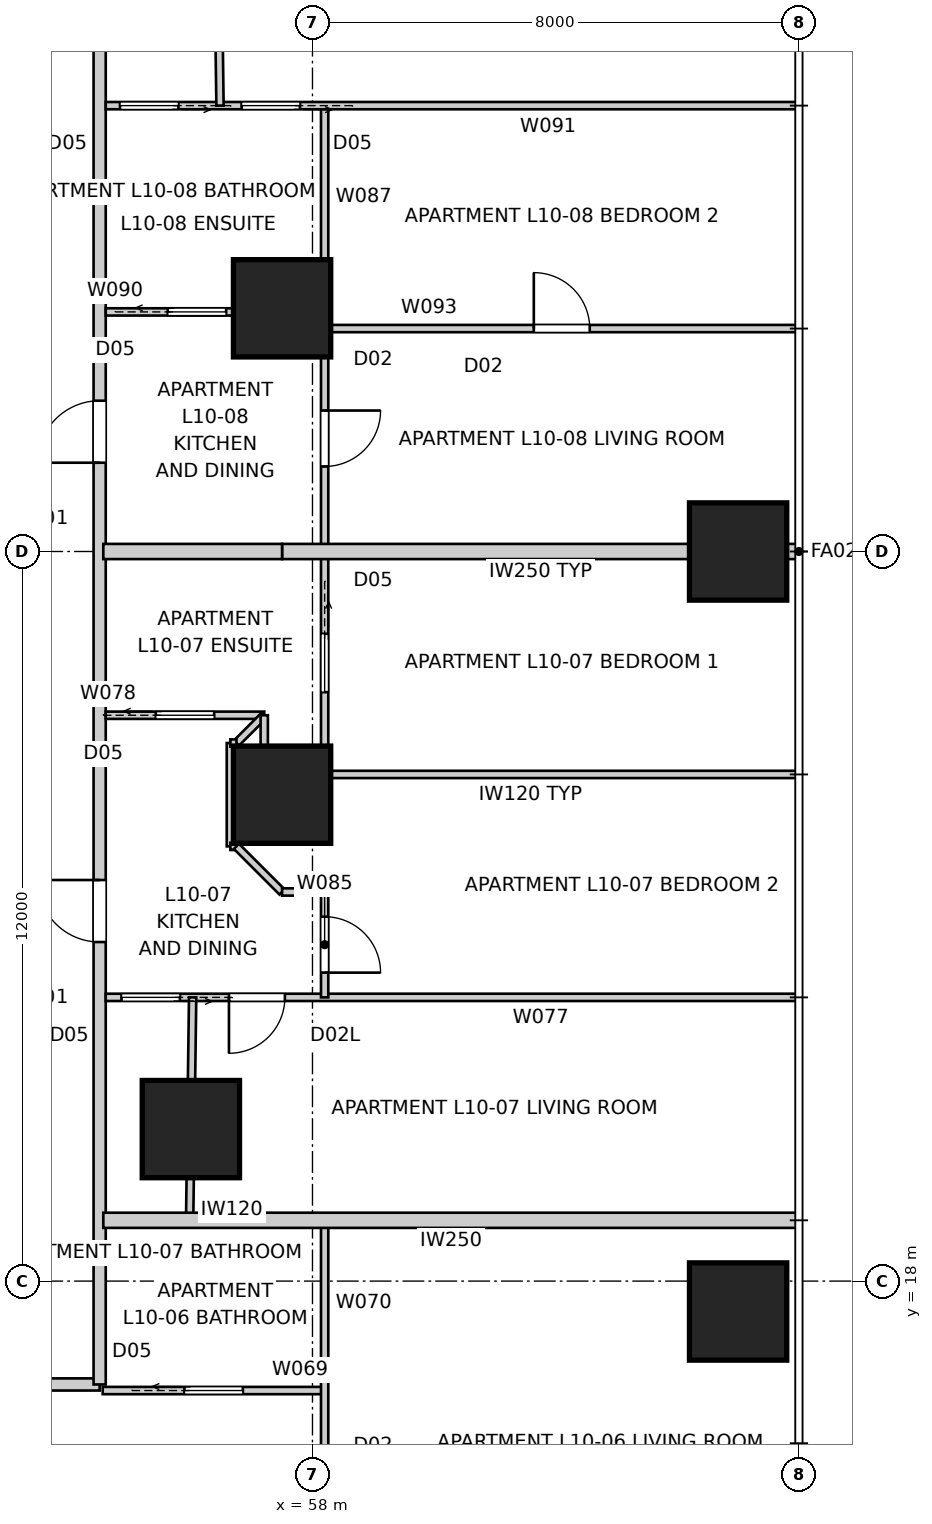
"""IFC4 building model, lengths in metres.
Left out: names, types, materials, properties, quantities, classifications, styles, units other than length and angle.
Written with IfcOpenShell. Run it as: python <this file> out.ifc"""

import sys

from ifc_helpers import new_model, si_unit, direction, frame, frame_2d, origin, origin_2d, place, context, subcontext, project, spatial, rectangle, extrude, element, fill, save


model = new_model("IFC4")
c1 = context("Model", 3, precision=1e-05, world=origin(), true_north=direction((0.0, 1.0)))
c2 = subcontext(c1, "Body", "Model", "MODEL_VIEW")
j1 = project(units=[si_unit("LENGTHUNIT", "METRE"), si_unit("PLANEANGLEUNIT", "RADIAN")], contexts=[c1])
p1 = place(None, origin())
s1 = spatial("IfcSite", under=j1, at=p1, CompositionType="ELEMENT")
p2 = place(p1, origin())
s2 = spatial("IfcBuilding", under=s1, at=p2, CompositionType="ELEMENT")
p3 = place(p2, frame((0.0, 0.0, 38.8)))
s3 = spatial("IfcBuildingStorey", under=s2, at=p3, CompositionType="ELEMENT", Elevation=38.8)
for number, where, z_axis, x_axis in (
    (1, (65.0, 17.5, 0.0), (0.0, 0.0, 1.0), (1.0, 0.0, 0.0)),
    (2, (65.0, 30.0, 0.0), (0.0, 0.0, 1.0), (1.0, 0.0, 0.0)),
):
    element("IfcColumn", number, at=place(p3, frame(where, z_axis=z_axis, x_axis=x_axis)), inside=s3, PredefinedType="COLUMN", context=c2, shape_type="SweptSolid", body=[
        extrude(rectangle(XDim=1.6, YDim=1.6, at=origin_2d()), origin(), (0.0, 0.0, 1.0), 3.2),
    ])
for number, where, z_axis, x_axis in (
    (3, (57.5, 26.0, 0.0), (0.0, 0.0, 1.0), (1.0, 0.0, 0.0)),
    (4, (57.5, 34.0, 0.0), (0.0, 0.0, 1.0), (1.0, 0.0, 0.0)),
    (5, (56.0, 20.5, 0.0), (0.0, 0.0, 1.0), (1.0, 0.0, 0.0)),
):
    element("IfcColumn", number, at=place(p3, frame(where, z_axis=z_axis, x_axis=x_axis)), inside=s3, PredefinedType="COLUMN", context=c2, shape_type="SweptSolid", body=[
        extrude(rectangle(XDim=1.6, YDim=1.6, at=origin_2d()), origin(), (0.0, 0.0, 1.0), 3.4),
    ])
p4 = place(p3, frame((26.3, 16.3, 0.0), z_axis=(0.0, 0.0, 1.0), x_axis=(1.0, 0.0, 0.0)))
e6 = element("IfcWall", 6, at=p4, inside=s3, PredefinedType="PARTITIONING", context=c2, shape_type="SweptSolid", body=[
    extrude(rectangle(XDim=28.2, YDim=0.2, at=frame_2d((14.1, 0.0))), origin(), (0.0, 0.0, 1.0), 3.2),
])
p5 = place(p4, frame((4.738, 0.0, 0.0)))
e7 = element("IfcOpeningElement", 7, at=p5, cuts=e6, PredefinedType="OPENING", context=c2, shape_type="SweptSolid", body=[
    extrude(rectangle(XDim=1.02, YDim=2.34, at=frame_2d((0.51, 1.17))), frame((0.0, 0.11, 0.0), z_axis=(0.0, -1.0, 0.0), x_axis=(1.0, 0.0, 0.0)), (0.0, 0.0, 1.0), 0.22),
])
p6 = place(p4, frame((14.525, 0.0, 0.0)))
e8 = element("IfcOpeningElement", 8, at=p6, cuts=e6, PredefinedType="OPENING", context=c2, shape_type="SweptSolid", body=[
    extrude(rectangle(XDim=1.02, YDim=2.34, at=frame_2d((0.51, 1.17))), frame((0.0, 0.11, 0.0), z_axis=(0.0, -1.0, 0.0), x_axis=(1.0, 0.0, 0.0)), (0.0, 0.0, 1.0), 0.22),
])
p7 = place(p4, frame((22.333, 0.0, 0.0)))
e9 = element("IfcOpeningElement", 9, at=p7, cuts=e6, PredefinedType="OPENING", context=c2, shape_type="SweptSolid", body=[
    extrude(rectangle(XDim=1.02, YDim=2.34, at=frame_2d((0.51, 1.17))), frame((0.0, 0.11, 0.0), z_axis=(0.0, -1.0, 0.0), x_axis=(1.0, 0.0, 0.0)), (0.0, 0.0, 1.0), 0.22),
])
p8 = place(p4, frame((25.765, 0.0, 0.0)))
e10 = element("IfcOpeningElement", 10, at=p8, cuts=e6, PredefinedType="OPENING", context=c2, shape_type="SweptSolid", body=[
    extrude(rectangle(XDim=1.02, YDim=2.0, at=frame_2d((0.51, 1.0))), frame((0.0, 0.11, 0.0), z_axis=(0.0, -1.0, 0.0), x_axis=(1.0, 0.0, 0.0)), (0.0, 0.0, 1.0), 0.22),
])
p9 = place(p4, frame((1.015, 0.0, 0.0)))
e11 = element("IfcOpeningElement", 11, at=p9, cuts=e6, PredefinedType="OPENING", context=c2, shape_type="SweptSolid", body=[
    extrude(rectangle(XDim=1.02, YDim=2.0, at=frame_2d((0.51, 1.0))), frame((0.0, 0.11, 0.0), z_axis=(0.0, -1.0, 0.0), x_axis=(1.0, 0.0, 0.0)), (0.0, 0.0, 1.0), 0.22),
])
p10 = place(p3, frame((54.5, 16.3, 0.0), z_axis=(0.0, 0.0, 1.0), x_axis=(0.0, 1.0, 0.0)))
e12 = element("IfcWall", 12, at=p10, inside=s3, PredefinedType="PARTITIONING", context=c2, shape_type="SweptSolid", body=[
    extrude(rectangle(XDim=28.2, YDim=0.2, at=frame_2d((14.1, 0.0))), origin(), (0.0, 0.0, 1.0), 3.2),
])
p11 = place(p10, frame((7.277, 0.0, 0.0)))
e13 = element("IfcOpeningElement", 13, at=p11, cuts=e12, PredefinedType="OPENING", context=c2, shape_type="SweptSolid", body=[
    extrude(rectangle(XDim=1.02, YDim=2.34, at=frame_2d((0.51, 1.17))), frame((0.0, 0.11, 0.0), z_axis=(0.0, -1.0, 0.0), x_axis=(1.0, 0.0, 0.0)), (0.0, 0.0, 1.0), 0.22),
])
p12 = place(p10, frame((15.16, 0.0, 0.0)))
e14 = element("IfcOpeningElement", 14, at=p12, cuts=e12, PredefinedType="OPENING", context=c2, shape_type="SweptSolid", body=[
    extrude(rectangle(XDim=1.02, YDim=2.34, at=frame_2d((0.51, 1.17))), frame((0.0, 0.11, 0.0), z_axis=(0.0, -1.0, 0.0), x_axis=(1.0, 0.0, 0.0)), (0.0, 0.0, 1.0), 0.22),
])
p13 = place(p3, frame((66.0, 19.0, 0.0), z_axis=(0.0, 0.0, 1.0), x_axis=(-1.0, 0.0, 0.0)))
e15 = element("IfcWall", 15, at=p13, inside=s3, PredefinedType="PARTITIONING", context=c2, shape_type="SweptSolid", body=[
    extrude(rectangle(XDim=11.44, YDim=0.25, at=frame_2d((5.72, 0.0))), origin(), (0.0, 0.0, 1.0), 3.2),
])
p14 = place(p3, frame((66.0, 30.0, 0.0), z_axis=(0.0, 0.0, 1.0), x_axis=(-1.0, 0.0, 0.0)))
e16 = element("IfcWall", 16, at=p14, inside=s3, PredefinedType="PARTITIONING", context=c2, shape_type="SweptSolid", body=[
    extrude(rectangle(XDim=8.5, YDim=0.25, at=frame_2d((4.25, 0.0))), origin(), (0.0, 0.0, 1.0), 3.2),
])
p15 = place(p3, frame((57.5, 30.0, 0.0), z_axis=(0.0, 0.0, 1.0), x_axis=(-1.0, 0.0, 0.0)))
e17 = element("IfcWall", 17, at=p15, inside=s3, PredefinedType="PARTITIONING", context=c2, shape_type="SweptSolid", body=[
    extrude(rectangle(XDim=2.94, YDim=0.25, at=frame_2d((1.47, 0.0))), origin(), (0.0, 0.0, 1.0), 2.671),
])
p16 = place(p3, frame((54.55, 16.2, 0.0), z_axis=(0.0, 0.0, 1.0), x_axis=(1.0, 0.0, 0.0)))
e18 = element("IfcWall", 18, at=p16, inside=s3, PredefinedType="PARTITIONING", context=c2, shape_type="SweptSolid", body=[
    extrude(rectangle(XDim=3.65, YDim=0.12, at=frame_2d((1.825, 0.0))), origin(), (0.0, 0.0, 1.0), 3.2),
])
p17 = place(p16, frame((1.345, 0.0, 0.0)))
e19 = element("IfcOpeningElement", 19, at=p17, cuts=e18, PredefinedType="OPENING", context=c2, shape_type="SweptSolid", body=[
    extrude(rectangle(XDim=0.96, YDim=2.1, at=frame_2d((0.48, 1.05))), frame((0.0, 0.07, 0.0), z_axis=(0.0, -1.0, 0.0), x_axis=(1.0, 0.0, 0.0)), (0.0, 0.0, 1.0), 0.14),
])
p18 = place(p3, frame((58.2, 19.0, 0.0), z_axis=(0.0, 0.0, 1.0), x_axis=(0.0, -1.0, 0.0)))
e20 = element("IfcWall", 20, at=p18, inside=s3, PredefinedType="PARTITIONING", context=c2, shape_type="SweptSolid", body=[
    extrude(rectangle(XDim=7.2, YDim=0.12, at=frame_2d((3.6, 0.0))), origin(), (0.0, 0.0, 1.0), 3.2),
])
p19 = place(p18, frame((4.54, 0.0, 0.0)))
e21 = element("IfcOpeningElement", 21, at=p19, cuts=e20, PredefinedType="OPENING", context=c2, shape_type="SweptSolid", body=[
    extrude(rectangle(XDim=0.92, YDim=2.34, at=frame_2d((0.46, 1.17))), frame((0.0, 0.07, 0.0), z_axis=(0.0, -1.0, 0.0), x_axis=(1.0, 0.0, 0.0)), (0.0, 0.0, 1.0), 0.14),
])
p20 = place(p3, frame((65.96, 22.667, 0.0), z_axis=(0.0, 0.0, 1.0), x_axis=(-1.0, 0.0, 0.0)))
e22 = element("IfcWall", 22, at=p20, inside=s3, PredefinedType="PARTITIONING", context=c2, shape_type="SweptSolid", body=[
    extrude(rectangle(XDim=11.36, YDim=0.12, at=frame_2d((5.68, 0.0))), origin(), (0.0, 0.0, 1.0), 3.2),
])
p21 = place(p20, frame((8.413, 0.0, 0.0)))
e23 = element("IfcOpeningElement", 23, at=p21, cuts=e22, PredefinedType="OPENING", context=c2, shape_type="SweptSolid", body=[
    extrude(rectangle(XDim=0.92, YDim=2.1, at=frame_2d((0.46, 1.05))), frame((0.0, 0.07, 0.0), z_axis=(0.0, -1.0, 0.0), x_axis=(1.0, 0.0, 0.0)), (0.0, 0.0, 1.0), 0.14),
])
p22 = place(p20, frame((10.14, 0.0, 0.0)))
e24 = element("IfcOpeningElement", 24, at=p22, cuts=e22, PredefinedType="OPENING", context=c2, shape_type="SweptSolid", body=[
    extrude(rectangle(XDim=0.96, YDim=2.1, at=frame_2d((0.48, 1.05))), frame((0.0, 0.07, 0.0), z_axis=(0.0, -1.0, 0.0), x_axis=(1.0, 0.0, 0.0)), (0.0, 0.0, 1.0), 0.14),
])
p23 = place(p3, frame((54.6, 27.307, 0.0), z_axis=(0.0, 0.0, 1.0), x_axis=(1.0, 0.0, 0.0)))
e25 = element("IfcWall", 25, at=p23, inside=s3, PredefinedType="PARTITIONING", context=c2, shape_type="SweptSolid", body=[
    extrude(rectangle(XDim=2.607, YDim=0.12, at=frame_2d((1.303, 0.0))), origin(), (0.0, 0.0, 1.0), 3.2),
])
p24 = place(p23, frame((0.823, 0.0, 0.0)))
e26 = element("IfcOpeningElement", 26, at=p24, cuts=e25, PredefinedType="OPENING", context=c2, shape_type="SweptSolid", body=[
    extrude(rectangle(XDim=0.96, YDim=2.1, at=frame_2d((0.48, 1.05))), frame((0.0, 0.07, 0.0), z_axis=(0.0, -1.0, 0.0), x_axis=(1.0, 0.0, 0.0)), (0.0, 0.0, 1.0), 0.14),
])
p25 = place(p3, frame((57.207, 27.307, 0.0), z_axis=(0.0, 0.0, 1.0), x_axis=(-0.707295771362, -0.706917740485, 0.0)))
e27 = element("IfcWall", 27, at=p25, inside=s3, PredefinedType="PARTITIONING", context=c2, shape_type="SweptSolid", body=[
    extrude(rectangle(XDim=0.646, YDim=0.12, at=frame_2d((0.323, 0.0))), origin(), (0.0, 0.0, 1.0), 3.2),
])
p26 = place(p3, frame((56.65, 26.85, 0.0), z_axis=(0.0, 0.0, 1.0), x_axis=(0.0, -1.0, 0.0)))
e28 = element("IfcWall", 28, at=p26, inside=s3, PredefinedType="PARTITIONING", context=c2, shape_type="SweptSolid", body=[
    extrude(rectangle(XDim=1.7, YDim=0.12, at=frame_2d((0.85, 0.0))), origin(), (0.0, 0.0, 1.0), 3.2),
])
p27 = place(p3, frame((56.75, 25.15, 0.0), z_axis=(0.0, 0.0, 1.0), x_axis=(0.707106781187, -0.707106781187, 0.0)))
e29 = element("IfcWall", 29, at=p27, inside=s3, PredefinedType="PARTITIONING", context=c2, shape_type="SweptSolid", body=[
    extrude(rectangle(XDim=1.061, YDim=0.12, at=frame_2d((0.53, 0.0))), origin(), (0.0, 0.0, 1.0), 3.2),
])
p28 = place(p3, frame((57.5, 24.4, 0.0), z_axis=(0.0, 0.0, 1.0), x_axis=(1.0, 0.0, 0.0)))
e30 = element("IfcWall", 30, at=p28, inside=s3, PredefinedType="PARTITIONING", context=c2, shape_type="SweptSolid", body=[
    extrude(rectangle(XDim=0.7, YDim=0.12, at=frame_2d((0.35, 0.0))), origin(), (0.0, 0.0, 1.0), 3.2),
])
p29 = place(p3, frame((58.2, 24.4, 0.0), z_axis=(0.0, 0.0, 1.0), x_axis=(0.0, -1.0, 0.0)))
e31 = element("IfcWall", 31, at=p29, inside=s3, PredefinedType="PARTITIONING", context=c2, shape_type="SweptSolid", body=[
    extrude(rectangle(XDim=1.733, YDim=0.12, at=frame_2d((0.867, 0.0))), origin(), (0.0, 0.0, 1.0), 3.2),
])
p30 = place(p29, frame((0.407, 0.0, 0.0)))
e32 = element("IfcOpeningElement", 32, at=p30, cuts=e31, PredefinedType="OPENING", context=c2, shape_type="SweptSolid", body=[
    extrude(rectangle(XDim=0.92, YDim=2.34, at=frame_2d((0.46, 1.17))), frame((0.0, 0.07, 0.0), z_axis=(0.0, -1.0, 0.0), x_axis=(1.0, 0.0, 0.0)), (0.0, 0.0, 1.0), 0.14),
])
p31 = place(p3, frame((56.029, 22.667, 0.0), z_axis=(0.0, 0.0, 1.0), x_axis=(-0.013448414164, -0.999909565989, 0.0)))
e33 = element("IfcWall", 33, at=p31, inside=s3, PredefinedType="PARTITIONING", context=c2, shape_type="SweptSolid", body=[
    extrude(rectangle(XDim=3.667, YDim=0.12, at=frame_2d((1.833, 0.0))), origin(), (0.0, 0.0, 1.0), 2.2),
])
p32 = place(p3, frame((58.2, 37.333, 0.0), z_axis=(0.0, 0.0, 1.0), x_axis=(0.0, -1.0, 0.0)))
e34 = element("IfcWall", 34, at=p32, inside=s3, PredefinedType="PARTITIONING", context=c2, shape_type="SweptSolid", body=[
    extrude(rectangle(XDim=11.0, YDim=0.12, at=frame_2d((5.5, 0.0))), origin(), (0.0, 0.0, 1.0), 3.2),
])
p33 = place(p32, frame((5.015, 0.0, 0.0)))
e35 = element("IfcOpeningElement", 35, at=p33, cuts=e34, PredefinedType="OPENING", context=c2, shape_type="SweptSolid", body=[
    extrude(rectangle(XDim=0.92, YDim=2.34, at=frame_2d((0.46, 1.17))), frame((0.0, 0.07, 0.0), z_axis=(0.0, -1.0, 0.0), x_axis=(1.0, 0.0, 0.0)), (0.0, 0.0, 1.0), 0.14),
])
p34 = place(p32, frame((8.687, 0.0, 0.0)))
e36 = element("IfcOpeningElement", 36, at=p34, cuts=e34, PredefinedType="OPENING", context=c2, shape_type="SweptSolid", body=[
    extrude(rectangle(XDim=0.96, YDim=2.1, at=frame_2d((0.48, 1.05))), frame((0.0, 0.07, 0.0), z_axis=(0.0, -1.0, 0.0), x_axis=(1.0, 0.0, 0.0)), (0.0, 0.0, 1.0), 0.14),
])
p35 = place(p3, frame((65.96, 26.333, 0.0), z_axis=(0.0, 0.0, 1.0), x_axis=(-1.0, 0.0, 0.0)))
e37 = element("IfcWall", 37, at=p35, inside=s3, PredefinedType="PARTITIONING", context=c2, shape_type="SweptSolid", body=[
    extrude(rectangle(XDim=8.753, YDim=0.12, at=frame_2d((4.376, 0.0))), origin(), (0.0, 0.0, 1.0), 3.2),
])
p36 = place(p3, frame((57.207, 26.333, 0.0), z_axis=(0.0, 0.0, 1.0), x_axis=(0.0, 1.0, 0.0)))
e38 = element("IfcWall", 38, at=p36, inside=s3, PredefinedType="PARTITIONING", context=c2, shape_type="SweptSolid", body=[
    extrude(rectangle(XDim=0.973, YDim=0.12, at=frame_2d((0.487, 0.0))), origin(), (0.0, 0.0, 1.0), 3.2),
])
p37 = place(p3, frame((54.6, 33.94, 0.0), z_axis=(0.0, 0.0, 1.0), x_axis=(1.0, 0.0, 0.0)))
e39 = element("IfcWall", 39, at=p37, inside=s3, PredefinedType="PARTITIONING", context=c2, shape_type="SweptSolid", body=[
    extrude(rectangle(XDim=3.6, YDim=0.12, at=frame_2d((1.8, 0.0))), origin(), (0.0, 0.0, 1.0), 3.2),
])
p38 = place(p37, frame((1.02, 0.0, 0.0)))
e40 = element("IfcOpeningElement", 40, at=p38, cuts=e39, PredefinedType="OPENING", context=c2, shape_type="SweptSolid", body=[
    extrude(rectangle(XDim=0.96, YDim=2.1, at=frame_2d((0.48, 1.05))), frame((0.0, 0.07, 0.0), z_axis=(0.0, -1.0, 0.0), x_axis=(1.0, 0.0, 0.0)), (0.0, 0.0, 1.0), 0.14),
])
p39 = place(p3, frame((65.96, 37.333, 0.0), z_axis=(0.0, 0.0, 1.0), x_axis=(-1.0, 0.0, 0.0)))
e41 = element("IfcWall", 41, at=p39, inside=s3, PredefinedType="PARTITIONING", context=c2, shape_type="SweptSolid", body=[
    extrude(rectangle(XDim=11.36, YDim=0.12, at=frame_2d((5.68, 0.0))), origin(), (0.0, 0.0, 1.0), 3.2),
])
p40 = place(p39, frame((8.166, 0.0, 0.0)))
e42 = element("IfcOpeningElement", 42, at=p40, cuts=e41, PredefinedType="OPENING", context=c2, shape_type="SweptSolid", body=[
    extrude(rectangle(XDim=0.96, YDim=2.1, at=frame_2d((0.48, 1.05))), frame((0.0, 0.07, 0.0), z_axis=(0.0, -1.0, 0.0), x_axis=(1.0, 0.0, 0.0)), (0.0, 0.0, 1.0), 0.14),
])
p41 = place(p39, frame((10.166, 0.0, 0.0)))
e43 = element("IfcOpeningElement", 43, at=p41, cuts=e41, PredefinedType="OPENING", context=c2, shape_type="SweptSolid", body=[
    extrude(rectangle(XDim=0.96, YDim=2.1, at=frame_2d((0.48, 1.05))), frame((0.0, 0.07, 0.0), z_axis=(0.0, -1.0, 0.0), x_axis=(1.0, 0.0, 0.0)), (0.0, 0.0, 1.0), 0.14),
])
p42 = place(p3, frame((56.43, 41.0, 0.0), z_axis=(0.0, 0.0, 1.0), x_axis=(0.013381849808, -0.999910459039, 0.0)))
e44 = element("IfcWall", 44, at=p42, inside=s3, PredefinedType="PARTITIONING", context=c2, shape_type="SweptSolid", body=[
    extrude(rectangle(XDim=3.667, YDim=0.12, at=frame_2d((1.833, 0.0))), origin(), (0.0, 0.0, 1.0), 2.2),
])
p43 = place(p3, frame((58.2, 33.667, 0.0), z_axis=(0.0, 0.0, 1.0), x_axis=(1.0, 0.0, 0.0)))
e45 = element("IfcWall", 45, at=p43, inside=s3, PredefinedType="PARTITIONING", context=c2, shape_type="SweptSolid", body=[
    extrude(rectangle(XDim=7.76, YDim=0.12, at=frame_2d((3.88, 0.0))), origin(), (0.0, 0.0, 1.0), 3.2),
])
p44 = place(p43, frame((3.44, 0.0, 0.0)))
e46 = element("IfcOpeningElement", 46, at=p44, cuts=e45, PredefinedType="OPENING", context=c2, shape_type="SweptSolid", body=[
    extrude(rectangle(XDim=0.92, YDim=2.34, at=frame_2d((0.46, 1.17))), frame((0.0, 0.07, 0.0), z_axis=(0.0, -1.0, 0.0), x_axis=(1.0, 0.0, 0.0)), (0.0, 0.0, 1.0), 0.14),
])
for number, where, z_axis, x_axis in (
    (47, (56.65, 26.85, 0.0), (0.0, 0.0, 1.0), (1.0, 0.0, 0.0)),
    (48, (56.65, 25.15, 0.0), (0.0, 0.0, 1.0), (1.0, 0.0, 0.0)),
):
    element("IfcWall", number, at=place(p3, frame(where, z_axis=z_axis, x_axis=x_axis)), inside=s3, PredefinedType="PARTITIONING", context=c2, shape_type="SweptSolid", body=[
        extrude(rectangle(XDim=0.1, YDim=0.12, at=frame_2d((0.05, 0.0))), origin(), (0.0, 0.0, 1.0), 3.2),
    ])
p45 = place(p11, origin())
e49 = element("IfcDoor", 49, at=p45, inside=s3, OperationType="SINGLE_SWING_RIGHT", PredefinedType="DOOR", context=c2, shape_type="SweptSolid", body=[
    extrude(rectangle(XDim=1.02, YDim=2.34, at=frame_2d((0.51, 1.17))), frame((0.0, 0.025, 0.0), z_axis=(0.0, -1.0, 0.0), x_axis=(1.0, 0.0, 0.0)), (0.0, 0.0, 1.0), 0.05),
])
fill(e13, e49)
p46 = place(p12, origin())
e50 = element("IfcDoor", 50, at=p46, inside=s3, OperationType="SINGLE_SWING_LEFT", PredefinedType="DOOR", context=c2, shape_type="SweptSolid", body=[
    extrude(rectangle(XDim=1.02, YDim=2.34, at=frame_2d((0.51, 1.17))), frame((0.0, 0.025, 0.0), z_axis=(0.0, -1.0, 0.0), x_axis=(1.0, 0.0, 0.0)), (0.0, 0.0, 1.0), 0.05),
])
fill(e14, e50)
p47 = place(p24, origin())
e51 = element("IfcDoor", 51, at=p47, inside=s3, OperationType="SLIDING_TO_LEFT", PredefinedType="DOOR", context=c2, shape_type="SweptSolid", body=[
    extrude(rectangle(XDim=0.96, YDim=2.1, at=frame_2d((0.48, 1.05))), frame((0.0, 0.025, 0.0), z_axis=(0.0, -1.0, 0.0), x_axis=(1.0, 0.0, 0.0)), (0.0, 0.0, 1.0), 0.05),
])
fill(e26, e51)
p48 = place(p21, origin())
e52 = element("IfcDoor", 52, at=p48, inside=s3, OperationType="SINGLE_SWING_RIGHT", PredefinedType="DOOR", context=c2, shape_type="SweptSolid", body=[
    extrude(rectangle(XDim=0.92, YDim=2.1, at=frame_2d((0.46, 1.05))), frame((0.0, 0.025, 0.0), z_axis=(0.0, -1.0, 0.0), x_axis=(1.0, 0.0, 0.0)), (0.0, 0.0, 1.0), 0.05),
])
fill(e23, e52)
p49 = place(p30, origin())
e53 = element("IfcDoor", 53, at=p49, inside=s3, OperationType="SINGLE_SWING_RIGHT", PredefinedType="DOOR", context=c2, shape_type="SweptSolid", body=[
    extrude(rectangle(XDim=0.92, YDim=2.34, at=frame_2d((0.46, 1.17))), frame((0.0, 0.025, 0.0), z_axis=(0.0, -1.0, 0.0), x_axis=(1.0, 0.0, 0.0)), (0.0, 0.0, 1.0), 0.05),
])
fill(e32, e53)
p50 = place(p22, origin())
e54 = element("IfcDoor", 54, at=p50, inside=s3, OperationType="SLIDING_TO_LEFT", PredefinedType="DOOR", context=c2, shape_type="SweptSolid", body=[
    extrude(rectangle(XDim=0.96, YDim=2.1, at=frame_2d((0.48, 1.05))), frame((0.0, 0.025, 0.0), z_axis=(0.0, -1.0, 0.0), x_axis=(1.0, 0.0, 0.0)), (0.0, 0.0, 1.0), 0.05),
])
fill(e24, e54)
p51 = place(p33, origin())
e55 = element("IfcDoor", 55, at=p51, inside=s3, OperationType="SINGLE_SWING_LEFT", PredefinedType="DOOR", context=c2, shape_type="SweptSolid", body=[
    extrude(rectangle(XDim=0.92, YDim=2.34, at=frame_2d((0.46, 1.17))), frame((0.0, 0.025, 0.0), z_axis=(0.0, -1.0, 0.0), x_axis=(1.0, 0.0, 0.0)), (0.0, 0.0, 1.0), 0.05),
])
fill(e35, e55)
p52 = place(p38, origin())
e56 = element("IfcDoor", 56, at=p52, inside=s3, OperationType="SLIDING_TO_LEFT", PredefinedType="DOOR", context=c2, shape_type="SweptSolid", body=[
    extrude(rectangle(XDim=0.96, YDim=2.1, at=frame_2d((0.48, 1.05))), frame((0.0, 0.025, 0.0), z_axis=(0.0, -1.0, 0.0), x_axis=(1.0, 0.0, 0.0)), (0.0, 0.0, 1.0), 0.05),
])
fill(e40, e56)
p53 = place(p17, origin())
e57 = element("IfcDoor", 57, at=p53, inside=s3, OperationType="SLIDING_TO_LEFT", PredefinedType="DOOR", context=c2, shape_type="SweptSolid", body=[
    extrude(rectangle(XDim=0.96, YDim=2.1, at=frame_2d((0.48, 1.05))), frame((0.0, 0.025, 0.0), z_axis=(0.0, -1.0, 0.0), x_axis=(1.0, 0.0, 0.0)), (0.0, 0.0, 1.0), 0.05),
])
fill(e19, e57)
p54 = place(p34, origin())
e58 = element("IfcDoor", 58, at=p54, inside=s3, OperationType="SLIDING_TO_LEFT", PredefinedType="DOOR", context=c2, shape_type="SweptSolid", body=[
    extrude(rectangle(XDim=0.96, YDim=2.1, at=frame_2d((0.48, 1.05))), frame((0.0, 0.025, 0.0), z_axis=(0.0, -1.0, 0.0), x_axis=(1.0, 0.0, 0.0)), (0.0, 0.0, 1.0), 0.05),
])
fill(e36, e58)
p55 = place(p44, origin())
e59 = element("IfcDoor", 59, at=p55, inside=s3, OperationType="SINGLE_SWING_LEFT", PredefinedType="DOOR", context=c2, shape_type="SweptSolid", body=[
    extrude(rectangle(XDim=0.92, YDim=2.34, at=frame_2d((0.46, 1.17))), frame((0.0, 0.025, 0.0), z_axis=(0.0, -1.0, 0.0), x_axis=(1.0, 0.0, 0.0)), (0.0, 0.0, 1.0), 0.05),
])
fill(e46, e59)
p56 = place(p40, origin())
e60 = element("IfcDoor", 60, at=p56, inside=s3, OperationType="SLIDING_TO_LEFT", PredefinedType="DOOR", context=c2, shape_type="SweptSolid", body=[
    extrude(rectangle(XDim=0.96, YDim=2.1, at=frame_2d((0.48, 1.05))), frame((0.0, 0.025, 0.0), z_axis=(0.0, -1.0, 0.0), x_axis=(1.0, 0.0, 0.0)), (0.0, 0.0, 1.0), 0.05),
])
fill(e42, e60)
p57 = place(p41, origin())
e61 = element("IfcDoor", 61, at=p57, inside=s3, OperationType="SLIDING_TO_LEFT", PredefinedType="DOOR", context=c2, shape_type="SweptSolid", body=[
    extrude(rectangle(XDim=0.96, YDim=2.1, at=frame_2d((0.48, 1.05))), frame((0.0, 0.025, 0.0), z_axis=(0.0, -1.0, 0.0), x_axis=(1.0, 0.0, 0.0)), (0.0, 0.0, 1.0), 0.05),
])
fill(e43, e61)
save(model, sys.argv[1])
